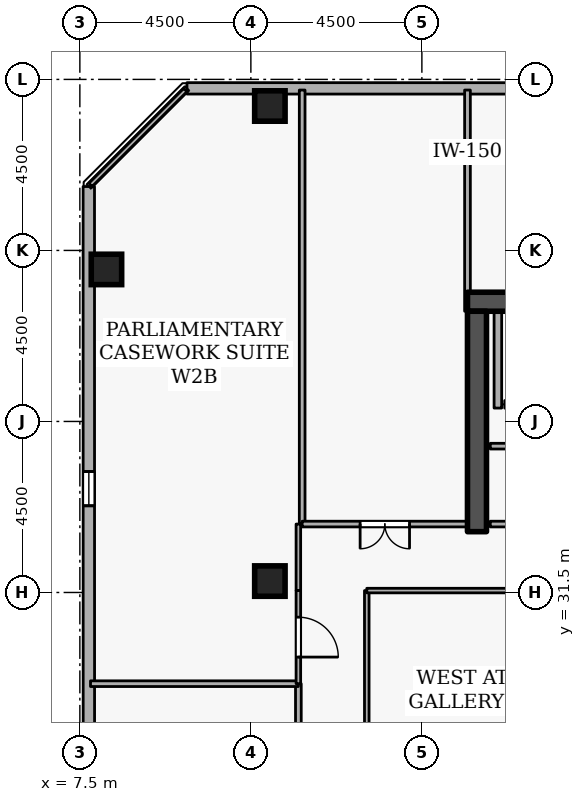
"""IFC4 building model, lengths in metres.
Left out: names, types, materials, properties, quantities, classifications, styles, units other than length and angle.
Written with IfcOpenShell. Run it as: python <this file> out.ifc"""

import sys

from ifc_helpers import new_model, si_unit, direction, frame, frame_2d, origin, origin_2d, place, context, subcontext, project, spatial, rectangle, extrude, element, fill, save


model = new_model("IFC4")
c1 = context("Model", 3, precision=1e-05, world=origin(), true_north=direction((0.0, 1.0)))
c2 = subcontext(c1, "Body", "Model", "MODEL_VIEW")
j1 = project(units=[si_unit("LENGTHUNIT", "METRE"), si_unit("PLANEANGLEUNIT", "RADIAN")], contexts=[c1])
p1 = place(None, origin())
s1 = spatial("IfcSite", under=j1, at=p1, CompositionType="ELEMENT")
p2 = place(p1, origin())
s2 = spatial("IfcBuilding", under=s1, at=p2, CompositionType="ELEMENT")
p3 = place(p2, frame((0.0, 0.0, 258.3)))
s3 = spatial("IfcBuildingStorey", under=s2, at=p3, CompositionType="ELEMENT", Elevation=258.3)
p4 = place(p3, frame((17.7, 39.15, 0.0), z_axis=(0.0, 0.0, 1.0), x_axis=(1.0, 0.0, 0.0)))
e1 = element("IfcWall", 1, at=p4, inside=s3, PredefinedType="SHEAR", context=c2, shape_type="SweptSolid", body=[
    extrude(rectangle(XDim=15.6, YDim=0.5, at=frame_2d((7.8, 0.0))), origin(), (0.0, 0.0, 1.0), 3.6),
])
p5 = place(p3, frame((17.95, 33.1, 0.0), z_axis=(0.0, 0.0, 1.0), x_axis=(0.0, 1.0, 0.0)))
e2 = element("IfcWall", 2, at=p5, inside=s3, PredefinedType="SHEAR", context=c2, shape_type="SweptSolid", body=[
    extrude(rectangle(XDim=5.8, YDim=0.5, at=frame_2d((2.9, 0.0))), origin(), (0.0, 0.0, 1.0), 3.6),
])
for number, where, z_axis, x_axis in (
    (3, (12.5, 44.3, 0.0), (0.0, 0.0, 1.0), (1.0, 0.0, 0.0)),
    (4, (8.2, 40.0, 0.0), (0.0, 0.0, 1.0), (1.0, 0.0, 0.0)),
    (5, (12.5, 31.8, 0.0), (0.0, 0.0, 1.0), (1.0, 0.0, 0.0)),
):
    element("IfcColumn", number, at=place(p3, frame(where, z_axis=z_axis, x_axis=x_axis)), inside=s3, PredefinedType="COLUMN", context=c2, shape_type="SweptSolid", body=[
        extrude(rectangle(XDim=0.8, YDim=0.8, at=origin_2d()), origin(), (0.0, 0.0, 1.0), 3.6),
    ])
p6 = place(p3, frame((45.302, 44.76, 0.0), z_axis=(0.0, 0.0, 1.0), x_axis=(-0.999999991209, 0.000132597301, 0.0)))
e6 = element("IfcWall", 6, at=p6, inside=s3, PredefinedType="STANDARD", context=c2, shape_type="SweptSolid", body=[
    extrude(rectangle(XDim=34.983, YDim=0.3, at=frame_2d((17.492, 0.0))), origin(), (0.0, 0.0, 1.0), 2.7),
])
p7 = place(p6, frame((2.7, 0.0, 0.72)))
e7 = element("IfcOpeningElement", 7, at=p7, cuts=e6, PredefinedType="OPENING", context=c2, shape_type="SweptSolid", body=[
    extrude(rectangle(XDim=0.9, YDim=1.75, at=frame_2d((0.45, 0.875))), frame((0.0, 0.16, 0.0), z_axis=(0.0, -1.0, 0.0), x_axis=(1.0, 0.0, 0.0)), (0.0, 0.0, 1.0), 0.32),
])
p8 = place(p6, frame((12.3, 0.0, 0.72)))
e8 = element("IfcOpeningElement", 8, at=p8, cuts=e6, PredefinedType="OPENING", context=c2, shape_type="SweptSolid", body=[
    extrude(rectangle(XDim=0.9, YDim=1.75, at=frame_2d((0.45, 0.875))), frame((0.0, 0.16, 0.0), z_axis=(0.0, -1.0, 0.0), x_axis=(1.0, 0.0, 0.0)), (0.0, 0.0, 1.0), 0.32),
])
p9 = place(p6, frame((17.1, 0.0, 0.72)))
e9 = element("IfcOpeningElement", 9, at=p9, cuts=e6, PredefinedType="OPENING", context=c2, shape_type="SweptSolid", body=[
    extrude(rectangle(XDim=0.9, YDim=1.75, at=frame_2d((0.45, 0.875))), frame((0.0, 0.16, 0.0), z_axis=(0.0, -1.0, 0.0), x_axis=(1.0, 0.0, 0.0)), (0.0, 0.0, 1.0), 0.32),
])
p10 = place(p6, frame((21.9, 0.0, 0.72)))
e10 = element("IfcOpeningElement", 10, at=p10, cuts=e6, PredefinedType="OPENING", context=c2, shape_type="SweptSolid", body=[
    extrude(rectangle(XDim=0.9, YDim=1.75, at=frame_2d((0.45, 0.875))), frame((0.0, 0.16, 0.0), z_axis=(0.0, -1.0, 0.0), x_axis=(1.0, 0.0, 0.0)), (0.0, 0.0, 1.0), 0.32),
])
p11 = place(p3, frame((7.735, 42.181, 0.0), z_axis=(0.0, 0.0, 1.0), x_axis=(0.000132597301, -0.999999991209, 0.0)))
e11 = element("IfcWall", 11, at=p11, inside=s3, PredefinedType="STANDARD", context=c2, shape_type="SweptSolid", body=[
    extrude(rectangle(XDim=34.983, YDim=0.3, at=frame_2d((17.492, 0.0))), origin(), (0.0, 0.0, 1.0), 2.7),
])
p12 = place(p11, frame((7.5, 0.0, 0.72)))
e12 = element("IfcOpeningElement", 12, at=p12, cuts=e11, PredefinedType="OPENING", context=c2, shape_type="SweptSolid", body=[
    extrude(rectangle(XDim=0.9, YDim=1.75, at=frame_2d((0.45, 0.875))), frame((0.0, 0.16, 0.0), z_axis=(0.0, -1.0, 0.0), x_axis=(1.0, 0.0, 0.0)), (0.0, 0.0, 1.0), 0.32),
])
p13 = place(p11, frame((21.9, 0.0, 0.72)))
e13 = element("IfcOpeningElement", 13, at=p13, cuts=e11, PredefinedType="OPENING", context=c2, shape_type="SweptSolid", body=[
    extrude(rectangle(XDim=0.9, YDim=1.75, at=frame_2d((0.45, 0.875))), frame((0.0, 0.16, 0.0), z_axis=(0.0, -1.0, 0.0), x_axis=(1.0, 0.0, 0.0)), (0.0, 0.0, 1.0), 0.32),
])
p14 = place(p11, frame((31.5, 0.0, 0.72)))
e14 = element("IfcOpeningElement", 14, at=p14, cuts=e11, PredefinedType="OPENING", context=c2, shape_type="SweptSolid", body=[
    extrude(rectangle(XDim=0.9, YDim=1.75, at=frame_2d((0.45, 0.875))), frame((0.0, 0.16, 0.0), z_axis=(0.0, -1.0, 0.0), x_axis=(1.0, 0.0, 0.0)), (0.0, 0.0, 1.0), 0.32),
])
p15 = place(p3, frame((20.62, 36.45, 0.0), z_axis=(0.0, 0.0, 1.0), x_axis=(-1.0, 0.0, 0.0)))
e15 = element("IfcWall", 15, at=p15, inside=s3, PredefinedType="STANDARD", context=c2, shape_type="SweptSolid", body=[
    extrude(rectangle(XDim=1.94, YDim=0.2, at=frame_2d((0.97, 0.0))), origin(), (0.0, 0.0, 1.0), 3.34),
])
p16 = place(p15, frame((0.46, 0.0, 0.0)))
e16 = element("IfcOpeningElement", 16, at=p16, cuts=e15, PredefinedType="OPENING", context=c2, shape_type="SweptSolid", body=[
    extrude(rectangle(XDim=1.02, YDim=2.06, at=frame_2d((0.51, 1.03))), frame((0.0, 0.11, 0.0), z_axis=(0.0, -1.0, 0.0), x_axis=(1.0, 0.0, 0.0)), (0.0, 0.0, 1.0), 0.22),
])
p17 = place(p3, frame((18.5, 36.352, 0.0), z_axis=(0.0, 0.0, 1.0), x_axis=(0.0, 1.0, 0.0)))
e17 = element("IfcWall", 17, at=p17, inside=s3, PredefinedType="STANDARD", context=c2, shape_type="SweptSolid", body=[
    extrude(rectangle(XDim=2.536, YDim=0.2, at=frame_2d((1.268, 0.0))), origin(), (0.0, 0.0, 1.0), 3.34),
])
p18 = place(p3, frame((18.3, 33.3, 0.0), z_axis=(0.0, 0.0, 1.0), x_axis=(1.0, 0.0, 0.0)))
e18 = element("IfcWall", 18, at=p18, inside=s3, PredefinedType="PARTITIONING", context=c2, shape_type="SweptSolid", body=[
    extrude(rectangle(XDim=2.25, YDim=0.15, at=frame_2d((1.125, 0.0))), origin(), (0.0, 0.0, 1.0), 3.34),
])
p19 = place(p18, frame((0.665, 0.0, 0.0)))
e19 = element("IfcOpeningElement", 19, at=p19, cuts=e18, PredefinedType="OPENING", context=c2, shape_type="SweptSolid", body=[
    extrude(rectangle(XDim=0.92, YDim=2.08, at=frame_2d((0.46, 1.04))), frame((0.0, 0.085, 0.0), z_axis=(0.0, -1.0, 0.0), x_axis=(1.0, 0.0, 0.0)), (0.0, 0.0, 1.0), 0.17),
])
p20 = place(p3, frame((20.55, 35.35, 0.0), z_axis=(0.0, 0.0, 1.0), x_axis=(-1.0, 0.0, 0.0)))
e20 = element("IfcWall", 20, at=p20, inside=s3, PredefinedType="PARTITIONING", context=c2, shape_type="SweptSolid", body=[
    extrude(rectangle(XDim=2.25, YDim=0.15, at=frame_2d((1.125, 0.0))), origin(), (0.0, 0.0, 1.0), 3.34),
])
p21 = place(p3, frame((13.35, 33.3, 0.0), z_axis=(0.0, 0.0, 1.0), x_axis=(0.0, 1.0, 0.0)))
e21 = element("IfcWall", 21, at=p21, inside=s3, PredefinedType="PARTITIONING", context=c2, shape_type="SweptSolid", body=[
    extrude(rectangle(XDim=11.42, YDim=0.15, at=frame_2d((5.71, 0.0))), origin(), (0.0, 0.0, 1.0), 3.34),
])
p22 = place(p3, frame((17.7, 44.72, 0.0), z_axis=(0.0, 0.0, 1.0), x_axis=(0.0, -1.0, 0.0)))
e22 = element("IfcWall", 22, at=p22, inside=s3, PredefinedType="PARTITIONING", context=c2, shape_type="SweptSolid", body=[
    extrude(rectangle(XDim=5.82, YDim=0.15, at=frame_2d((2.91, 0.0))), origin(), (0.0, 0.0, 1.0), 2.545),
])
p23 = place(p3, frame((17.7, 33.3, 0.0), z_axis=(0.0, 0.0, 1.0), x_axis=(-1.0, 0.0, 0.0)))
e23 = element("IfcWall", 23, at=p23, inside=s3, PredefinedType="PARTITIONING", context=c2, shape_type="SweptSolid", body=[
    extrude(rectangle(XDim=4.35, YDim=0.15, at=frame_2d((2.175, 0.0))), origin(), (0.0, 0.0, 1.0), 3.34),
])
p24 = place(p23, frame((1.525, 0.0, 0.0)))
e24 = element("IfcOpeningElement", 24, at=p24, cuts=e23, PredefinedType="OPENING", context=c2, shape_type="SweptSolid", body=[
    extrude(rectangle(XDim=1.3, YDim=2.12, at=frame_2d((0.65, 1.06))), frame((0.0, 0.085, 0.0), z_axis=(0.0, -1.0, 0.0), x_axis=(1.0, 0.0, 0.0)), (0.0, 0.0, 1.0), 0.17),
])
p25 = place(p3, frame((13.25, 29.1, 0.0), z_axis=(0.0, 0.0, 1.0), x_axis=(0.0, -1.0, 0.0)))
e25 = element("IfcWall", 25, at=p25, inside=s3, PredefinedType="PARTITIONING", context=c2, shape_type="SweptSolid", body=[
    extrude(rectangle(XDim=4.2, YDim=0.15, at=frame_2d((2.1, 0.0))), origin(), (0.0, 0.0, 1.0), 3.34),
])
p26 = place(p25, frame((1.45, 0.0, 0.0)))
e26 = element("IfcOpeningElement", 26, at=p26, cuts=e25, PredefinedType="OPENING", context=c2, shape_type="SweptSolid", body=[
    extrude(rectangle(XDim=1.3, YDim=2.12, at=frame_2d((0.65, 1.06))), frame((0.0, 0.085, 0.0), z_axis=(0.0, -1.0, 0.0), x_axis=(1.0, 0.0, 0.0)), (0.0, 0.0, 1.0), 0.17),
])
p27 = place(p3, frame((7.78, 29.1, 0.0), z_axis=(0.0, 0.0, 1.0), x_axis=(1.0, 0.0, 0.0)))
e27 = element("IfcWall", 27, at=p27, inside=s3, PredefinedType="PARTITIONING", context=c2, shape_type="SweptSolid", body=[
    extrude(rectangle(XDim=5.47, YDim=0.15, at=frame_2d((2.735, 0.0))), origin(), (0.0, 0.0, 1.0), 3.34),
])
p28 = place(p3, frame((7.78, 42.225, 0.0), z_axis=(0.0, 0.0, 1.0), x_axis=(0.707106781187, 0.707106781187, 0.0)))
e28 = element("IfcWall", 28, at=p28, inside=s3, PredefinedType="PARTITIONING", context=c2, shape_type="SweptSolid", body=[
    extrude(rectangle(XDim=3.528, YDim=0.12, at=frame_2d((1.764, 0.0))), origin(), (0.0, 0.0, 1.0), 3.34),
])
p29 = place(p3, frame((13.25, 33.3, 0.0), z_axis=(0.0, 0.0, 1.0), x_axis=(0.0, -1.0, 0.0)))
e29 = element("IfcWall", 29, at=p29, inside=s3, PredefinedType="PARTITIONING", context=c2, shape_type="SweptSolid", body=[
    extrude(rectangle(XDim=1.75, YDim=0.12, at=frame_2d((0.875, 0.0))), origin(), (0.0, 0.0, 1.0), 3.34),
])
p30 = place(p3, frame((13.25, 31.55, 0.0), z_axis=(0.0, 0.0, 1.0), x_axis=(0.0, -1.0, 0.0)))
e30 = element("IfcWall", 30, at=p30, inside=s3, PredefinedType="PARTITIONING", context=c2, shape_type="SweptSolid", body=[
    extrude(rectangle(XDim=2.45, YDim=0.12, at=frame_2d((1.225, 0.0))), origin(), (0.0, 0.0, 1.0), 3.34),
])
p31 = place(p30, frame((0.7, 0.0, 0.0)))
e31 = element("IfcOpeningElement", 31, at=p31, cuts=e30, PredefinedType="OPENING", context=c2, shape_type="SweptSolid", body=[
    extrude(rectangle(XDim=1.05, YDim=2.1, at=frame_2d((0.525, 1.05))), frame((0.0, 0.07, 0.0), z_axis=(0.0, -1.0, 0.0), x_axis=(1.0, 0.0, 0.0)), (0.0, 0.0, 1.0), 0.14),
])
p32 = place(p3, frame((15.05, 22.45, 0.0), z_axis=(0.0, 0.0, 1.0), x_axis=(0.0, 1.0, 0.0)))
e32 = element("IfcWall", 32, at=p32, inside=s3, PredefinedType="PARTITIONING", context=c2, shape_type="SweptSolid", body=[
    extrude(rectangle(XDim=9.1, YDim=0.12, at=frame_2d((4.55, 0.0))), origin(), (0.0, 0.0, 1.0), 3.34),
])
p33 = place(p32, frame((4.075, 0.0, 0.0)))
e33 = element("IfcOpeningElement", 33, at=p33, cuts=e32, PredefinedType="OPENING", context=c2, shape_type="SweptSolid", body=[
    extrude(rectangle(XDim=0.95, YDim=2.1, at=frame_2d((0.475, 1.05))), frame((0.0, 0.07, 0.0), z_axis=(0.0, -1.0, 0.0), x_axis=(1.0, 0.0, 0.0)), (0.0, 0.0, 1.0), 0.14),
])
p34 = place(p3, frame((15.05, 31.55, 0.0), z_axis=(0.0, 0.0, 1.0), x_axis=(1.0, 0.0, 0.0)))
e34 = element("IfcWall", 34, at=p34, inside=s3, PredefinedType="PARTITIONING", context=c2, shape_type="SweptSolid", body=[
    extrude(rectangle(XDim=5.85, YDim=0.12, at=frame_2d((2.925, 0.0))), origin(), (0.0, 0.0, 1.0), 3.34),
])
p35 = place(p12, origin())
e35 = element("IfcWindow", 35, at=p35, inside=s3, PartitioningType="SINGLE_PANEL", PredefinedType="WINDOW", context=c2, shape_type="SweptSolid", body=[
    extrude(rectangle(XDim=0.9, YDim=1.75, at=frame_2d((0.45, 0.875))), frame((0.0, 0.03, 0.0), z_axis=(0.0, -1.0, 0.0), x_axis=(1.0, 0.0, 0.0)), (0.0, 0.0, 1.0), 0.06),
])
fill(e12, e35)
p36 = place(p24, origin())
e36 = element("IfcDoor", 36, at=p36, inside=s3, OperationType="DOUBLE_DOOR_SINGLE_SWING", PredefinedType="DOOR", context=c2, shape_type="SweptSolid", body=[
    extrude(rectangle(XDim=1.3, YDim=2.12, at=frame_2d((0.65, 1.06))), frame((0.0, 0.025, 0.0), z_axis=(0.0, -1.0, 0.0), x_axis=(1.0, 0.0, 0.0)), (0.0, 0.0, 1.0), 0.05),
])
fill(e24, e36)
p37 = place(p31, origin())
e37 = element("IfcDoor", 37, at=p37, inside=s3, OperationType="SINGLE_SWING_RIGHT", PredefinedType="DOOR", context=c2, shape_type="SweptSolid", body=[
    extrude(rectangle(XDim=1.05, YDim=2.1, at=frame_2d((0.525, 1.05))), frame((0.0, 0.025, 0.0), z_axis=(0.0, -1.0, 0.0), x_axis=(1.0, 0.0, 0.0)), (0.0, 0.0, 1.0), 0.05),
])
fill(e31, e37)
save(model, sys.argv[1])
